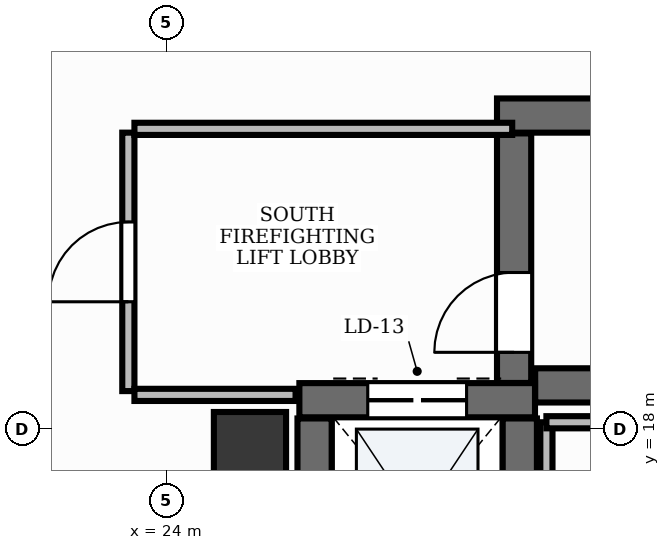
"""IFC4 building model, lengths in metres.
Left out: names, types, materials, properties, quantities, classifications, styles, units other than length and angle.
Written with IfcOpenShell. Run it as: python <this file> out.ifc"""

import sys

from ifc_helpers import new_model, si_unit, direction, frame, frame_2d, origin, origin_2d, place, context, subcontext, project, spatial, rectangle, extrude, element, fill, save


model = new_model("IFC4")
c1 = context("Model", 3, precision=1e-05, world=origin(), true_north=direction((0.0, 1.0)))
c2 = subcontext(c1, "Body", "Model", "MODEL_VIEW")
j1 = project(units=[si_unit("LENGTHUNIT", "METRE"), si_unit("PLANEANGLEUNIT", "RADIAN")], contexts=[c1])
p1 = place(None, origin())
s1 = spatial("IfcSite", under=j1, at=p1, CompositionType="ELEMENT")
p2 = place(p1, origin())
s2 = spatial("IfcBuilding", under=s1, at=p2, CompositionType="ELEMENT")
p3 = place(p2, frame((0.0, 0.0, 148.8)))
s3 = spatial("IfcBuildingStorey", under=s2, at=p3, CompositionType="ELEMENT", Elevation=148.8)
p4 = place(p3, frame((28.852, 18.575, 0.0), z_axis=(0.0, 0.0, 1.0), x_axis=(1.0, 0.0, 0.0)))
e1 = element("IfcWall", 1, at=p4, inside=s3, PredefinedType="SHEAR", context=c2, shape_type="SweptSolid", body=[
    extrude(rectangle(XDim=8.248, YDim=0.45, at=frame_2d((4.124, 0.0))), origin(), (0.0, 0.0, 1.0), 5.1),
])
p5 = place(p3, frame((28.35, 22.125, 0.0), z_axis=(0.0, 0.0, 1.0), x_axis=(1.0, 0.0, 0.0)))
e2 = element("IfcWall", 2, at=p5, inside=s3, PredefinedType="SHEAR", context=c2, shape_type="SweptSolid", body=[
    extrude(rectangle(XDim=8.75, YDim=0.45, at=frame_2d((4.375, 0.0))), origin(), (0.0, 0.0, 1.0), 5.1),
])
p6 = place(p3, frame((28.575, 18.607, 0.0), z_axis=(0.0, 0.0, 1.0), x_axis=(0.0, 1.0, 0.0)))
e3 = element("IfcWall", 3, at=p6, inside=s3, PredefinedType="SHEAR", context=c2, shape_type="SweptSolid", body=[
    extrude(rectangle(XDim=3.283, YDim=0.45, at=frame_2d((1.642, 0.0))), origin(), (0.0, 0.0, 1.0), 5.1),
])
p7 = place(p6, frame((0.403, 0.0, 0.0)))
e4 = element("IfcOpeningElement", 4, at=p7, cuts=e3, PredefinedType="OPENING", context=c2, shape_type="SweptSolid", body=[
    extrude(rectangle(XDim=1.05, YDim=2.15, at=frame_2d((0.525, 1.075))), frame((0.0, 0.24, 0.0), z_axis=(0.0, -1.0, 0.0), x_axis=(1.0, 0.0, 0.0)), (0.0, 0.0, 1.0), 0.48),
])
p8 = place(p3, frame((25.75, 18.38, 0.0), z_axis=(0.0, 0.0, 1.0), x_axis=(1.0, 0.0, 0.0)))
e5 = element("IfcWall", 5, at=p8, inside=s3, PredefinedType="SHEAR", context=c2, shape_type="SweptSolid", body=[
    extrude(rectangle(XDim=3.1, YDim=0.45, at=frame_2d((1.55, 0.0))), origin(), (0.0, 0.0, 1.0), 5.1),
])
p9 = place(p8, frame((0.9, 0.0, 0.0)))
e6 = element("IfcOpeningElement", 6, at=p9, cuts=e5, PredefinedType="OPENING", context=c2, shape_type="SweptSolid", body=[
    extrude(rectangle(XDim=1.3, YDim=2.2, at=frame_2d((0.65, 1.1))), frame((0.0, 0.24, 0.0), z_axis=(0.0, -1.0, 0.0), x_axis=(1.0, 0.0, 0.0)), (0.0, 0.0, 1.0), 0.48),
])
for number, where, z_axis, x_axis in (
    (7, (25.95, 15.44, 0.0), (0.0, 0.0, 1.0), (0.0, 1.0, 0.0)),
    (8, (28.65, 15.44, 0.0), (0.0, 0.0, 1.0), (0.0, 1.0, 0.0)),
):
    element("IfcWall", number, at=place(p3, frame(where, z_axis=z_axis, x_axis=x_axis)), inside=s3, PredefinedType="SHEAR", context=c2, shape_type="SweptSolid", body=[
        extrude(rectangle(XDim=2.7, YDim=0.45, at=frame_2d((1.35, 0.0))), origin(), (0.0, 0.0, 1.0), 5.1),
    ])
p10 = place(p3, frame((25.1, 17.75, -0.0), z_axis=(0.0, 0.0, 1.0), x_axis=(1.0, 0.0, 0.0)))
e9 = element("IfcColumn", 9, at=p10, inside=s3, PredefinedType="PILASTER", context=c2, shape_type="SweptSolid", body=[
    extrude(rectangle(XDim=0.95, YDim=0.95, at=origin_2d()), origin(), (0.0, 0.0, 1.0), 5.101),
])
p11 = place(p3, frame((23.5, 18.5, 0.0), z_axis=(0.0, 0.0, 1.0), x_axis=(0.0, 1.0, 0.0)))
e10 = element("IfcWall", 10, at=p11, inside=s3, PredefinedType="PARTITIONING", context=c2, shape_type="SweptSolid", body=[
    extrude(rectangle(XDim=3.4, YDim=0.16, at=frame_2d((1.7, 0.0))), origin(), (0.0, 0.0, 1.0), 3.96),
])
p12 = place(p11, frame((1.175, 0.0, 0.0)))
e11 = element("IfcOpeningElement", 11, at=p12, cuts=e10, PredefinedType="OPENING", context=c2, shape_type="SweptSolid", body=[
    extrude(rectangle(XDim=1.05, YDim=2.15, at=frame_2d((0.525, 1.075))), frame((0.0, 0.095, 0.0), z_axis=(0.0, -1.0, 0.0), x_axis=(1.0, 0.0, 0.0)), (0.0, 0.0, 1.0), 0.19),
])
p13 = place(p3, frame((23.58, 21.95, 0.0), z_axis=(0.0, 0.0, 1.0), x_axis=(1.0, 0.0, 0.0)))
e12 = element("IfcWall", 12, at=p13, inside=s3, PredefinedType="PARTITIONING", context=c2, shape_type="SweptSolid", body=[
    extrude(rectangle(XDim=4.97, YDim=0.16, at=frame_2d((2.485, 0.0))), origin(), (0.0, 0.0, 1.0), 3.96),
])
p14 = place(p3, frame((23.58, 18.45, 0.0), z_axis=(0.0, 0.0, 1.0), x_axis=(1.0, 0.0, 0.0)))
e13 = element("IfcWall", 13, at=p14, inside=s3, PredefinedType="PARTITIONING", context=c2, shape_type="SweptSolid", body=[
    extrude(rectangle(XDim=2.12, YDim=0.16, at=frame_2d((1.06, 0.0))), origin(), (0.0, 0.0, 1.0), 3.96),
])
p15 = place(p3, frame((29.0, 14.954, 0.0), z_axis=(0.0, 0.0, 1.0), x_axis=(0.0, 1.0, 0.0)))
e14 = element("IfcWall", 14, at=p15, inside=s3, PredefinedType="PARTITIONING", context=c2, shape_type="SweptSolid", body=[
    extrude(rectangle(XDim=3.136, YDim=0.16, at=frame_2d((1.568, 0.0))), origin(), (0.0, 0.0, 1.0), 3.96),
])
p16 = place(p3, frame((29.0, 18.09, 0.0), z_axis=(0.0, 0.0, 1.0), x_axis=(1.0, 0.0, 0.0)))
e15 = element("IfcWall", 15, at=p16, inside=s3, PredefinedType="PARTITIONING", context=c2, shape_type="SweptSolid", body=[
    extrude(rectangle(XDim=7.602, YDim=0.16, at=frame_2d((3.801, 0.0))), origin(), (0.0, 0.0, 1.0), 3.96),
])
p17 = place(p7, origin())
e16 = element("IfcDoor", 16, at=p17, inside=s3, OperationType="SINGLE_SWING_LEFT", PredefinedType="DOOR", context=c2, shape_type="SweptSolid", body=[
    extrude(rectangle(XDim=1.05, YDim=2.15, at=frame_2d((0.525, 1.075))), frame((0.0, 0.025, 0.0), z_axis=(0.0, -1.0, 0.0), x_axis=(1.0, 0.0, 0.0)), (0.0, 0.0, 1.0), 0.05),
])
fill(e4, e16)
p18 = place(p9, origin())
e17 = element("IfcDoor", 17, at=p18, inside=s3, OperationType="DOUBLE_DOOR_SLIDING", PredefinedType="DOOR", context=c2, shape_type="SweptSolid", body=[
    extrude(rectangle(XDim=1.3, YDim=2.2, at=frame_2d((0.65, 1.1))), frame((0.0, 0.025, 0.0), z_axis=(0.0, -1.0, 0.0), x_axis=(1.0, 0.0, 0.0)), (0.0, 0.0, 1.0), 0.05),
])
fill(e6, e17)
p19 = place(p12, origin())
e18 = element("IfcDoor", 18, at=p19, inside=s3, OperationType="SINGLE_SWING_LEFT", PredefinedType="DOOR", context=c2, shape_type="SweptSolid", body=[
    extrude(rectangle(XDim=1.05, YDim=2.15, at=frame_2d((0.525, 1.075))), frame((0.0, 0.025, 0.0), z_axis=(0.0, -1.0, 0.0), x_axis=(1.0, 0.0, 0.0)), (0.0, 0.0, 1.0), 0.05),
])
fill(e11, e18)
save(model, sys.argv[1])
